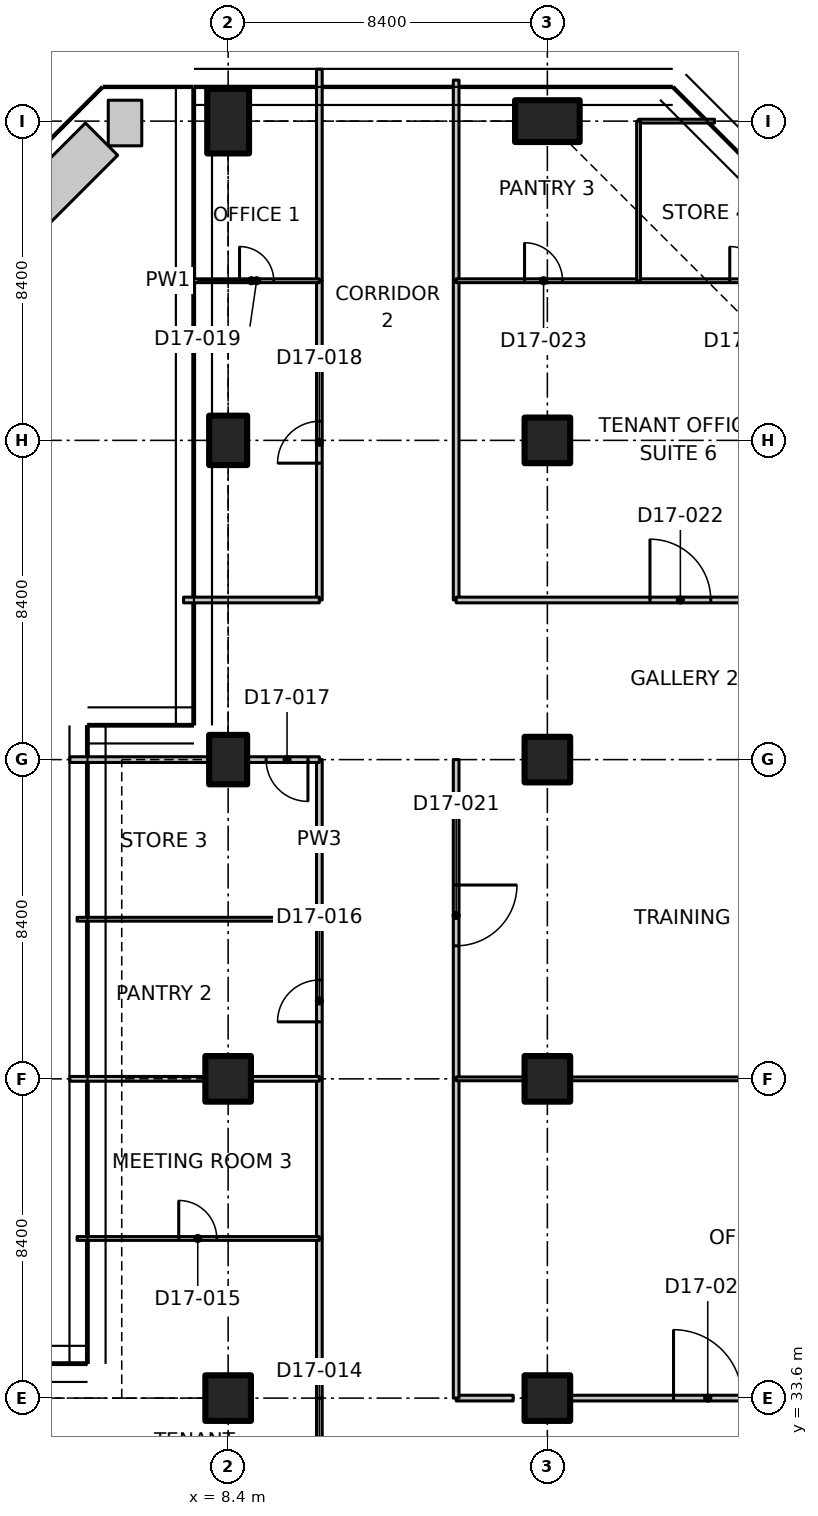
"""IFC4 building model, lengths in metres.
Left out: names, types, materials, properties, quantities, classifications, styles, units other than length and angle.
Written with IfcOpenShell. Run it as: python <this file> out.ifc"""

import sys

from ifc_helpers import new_model, si_unit, direction, frame, frame_2d, origin, origin_2d, place, context, subcontext, project, spatial, polyline, rectangle, outline, extrude, element, fill, save


model = new_model("IFC4")
c1 = context("Model", 3, precision=1e-05, world=origin(), true_north=direction((0.0, 1.0)))
c2 = subcontext(c1, "Body", "Model", "MODEL_VIEW")
j1 = project(units=[si_unit("LENGTHUNIT", "METRE"), si_unit("PLANEANGLEUNIT", "RADIAN")], contexts=[c1])
p1 = place(None, origin())
s1 = spatial("IfcSite", under=j1, at=p1, CompositionType="ELEMENT")
p2 = place(p1, origin())
s2 = spatial("IfcBuilding", under=s1, at=p2, CompositionType="ELEMENT")
p3 = place(p2, frame((0.0, 0.0, 134.9)))
s3 = spatial("IfcBuildingStorey", under=s2, at=p3, CompositionType="ELEMENT", Elevation=134.9)
for number, where, z_axis, x_axis in (
    (1, (8.4, 33.6, 0.0), (0.0, 0.0, 1.0), (1.0, 0.0, 0.0)),
    (2, (8.4, 42.0, 0.0), (0.0, 0.0, 1.0), (1.0, 0.0, 0.0)),
):
    element("IfcColumn", number, at=place(p3, frame(where, z_axis=z_axis, x_axis=x_axis)), inside=s3, PredefinedType="COLUMN", context=c2, shape_type="SweptSolid", body=[
        extrude(rectangle(XDim=1.2, YDim=1.2, at=origin_2d()), origin(), (0.0, 0.0, 1.0), 3.35),
    ])
for number, where, z_axis, x_axis in (
    (3, (8.4, 50.4, 0.0), (0.0, 0.0, 1.0), (1.0, 0.0, 0.0)),
    (4, (8.4, 58.8, 0.0), (0.0, 0.0, 1.0), (1.0, 0.0, 0.0)),
):
    element("IfcColumn", number, at=place(p3, frame(where, z_axis=z_axis, x_axis=x_axis)), inside=s3, PredefinedType="COLUMN", context=c2, shape_type="SweptSolid", body=[
        extrude(rectangle(XDim=1.0, YDim=1.3, at=origin_2d()), origin(), (0.0, 0.0, 1.0), 3.35),
    ])
p4 = place(p3, frame((8.4, 67.2, 0.0), z_axis=(0.0, 0.0, 1.0), x_axis=(1.0, 0.0, 0.0)))
e5 = element("IfcColumn", 5, at=p4, inside=s3, PredefinedType="COLUMN", context=c2, shape_type="SweptSolid", body=[
    extrude(rectangle(XDim=1.1, YDim=1.7, at=origin_2d()), origin(), (0.0, 0.0, 1.0), 3.35),
])
for number, where, z_axis, x_axis in (
    (6, (16.8, 33.6, 0.0), (0.0, 0.0, 1.0), (1.0, 0.0, 0.0)),
    (7, (16.8, 42.0, 0.0), (0.0, 0.0, 1.0), (1.0, 0.0, 0.0)),
    (8, (16.8, 50.4, 0.0), (0.0, 0.0, 1.0), (1.0, 0.0, 0.0)),
    (9, (16.8, 58.8, 0.0), (0.0, 0.0, 1.0), (1.0, 0.0, 0.0)),
):
    element("IfcColumn", number, at=place(p3, frame(where, z_axis=z_axis, x_axis=x_axis)), inside=s3, PredefinedType="COLUMN", context=c2, shape_type="SweptSolid", body=[
        extrude(rectangle(XDim=1.2, YDim=1.2, at=origin_2d()), origin(), (0.0, 0.0, 1.0), 3.35),
    ])
p5 = place(p3, frame((16.8, 67.2, 0.0), z_axis=(0.0, 0.0, 1.0), x_axis=(0.0, 1.0, 0.0)))
e10 = element("IfcColumn", 10, at=p5, inside=s3, PredefinedType="COLUMN", context=c2, shape_type="SweptSolid", body=[
    extrude(rectangle(XDim=1.1, YDim=1.7, at=origin_2d()), origin(), (0.0, 0.0, 1.0), 3.35),
])
p6 = place(p3, frame((6.127, 67.15, 0.0), z_axis=(0.0, 0.0, 1.0), x_axis=(-1.0, 0.0, 0.0)))
e11 = element("IfcWall", 11, at=p6, inside=s3, PredefinedType="PARAPET", context=c2, shape_type="SweptSolid", body=[
    extrude(rectangle(XDim=0.882, YDim=1.2, at=frame_2d((0.441, 0.0))), origin(), (0.0, 0.0, 1.0), 1.3),
])
p7 = place(p3, frame((5.069, 66.726, 0.0), z_axis=(0.0, 0.0, 1.0), x_axis=(-0.707106781187, -0.707106781187, 0.0)))
e12 = element("IfcWall", 12, at=p7, inside=s3, PredefinedType="PARAPET", context=c2, shape_type="SweptSolid", body=[
    extrude(rectangle(XDim=7.347, YDim=1.2, at=frame_2d((3.673, 0.0))), origin(), (0.0, 0.0, 1.0), 1.3),
])
p8 = place(p3, frame((10.8, 29.4, 0.0), z_axis=(0.0, 0.0, 1.0), x_axis=(0.0, 1.0, 0.0)))
e13 = element("IfcWall", 13, at=p8, inside=s3, PredefinedType="PARTITIONING", context=c2, shape_type="SweptSolid", body=[
    extrude(rectangle(XDim=4.2, YDim=0.15, at=frame_2d((2.1, 0.0))), origin(), (0.0, 0.0, 1.0), 3.33),
])
p9 = place(p8, frame((1.2, 0.0, 0.0)))
e14 = element("IfcOpeningElement", 14, at=p9, cuts=e13, PredefinedType="OPENING", context=c2, shape_type="SweptSolid", body=[
    extrude(rectangle(XDim=1.6, YDim=2.1, at=frame_2d((0.8, 1.05))), frame((0.0, 0.085, 0.0), z_axis=(0.0, -1.0, 0.0), x_axis=(1.0, 0.0, 0.0)), (0.0, 0.0, 1.0), 0.17),
])
p10 = place(p3, frame((14.4, 33.6, 0.0), z_axis=(0.0, 0.0, 1.0), x_axis=(1.0, 0.0, 0.0)))
e15 = element("IfcWall", 15, at=p10, inside=s3, PredefinedType="PARTITIONING", context=c2, shape_type="SweptSolid", body=[
    extrude(rectangle(XDim=1.5, YDim=0.15, at=frame_2d((0.75, 0.0))), origin(), (0.0, 0.0, 1.0), 3.33),
])
p11 = place(p3, frame((17.42, 33.6, 0.0), z_axis=(0.0, 0.0, 1.0), x_axis=(1.0, 0.0, 0.0)))
e16 = element("IfcWall", 16, at=p11, inside=s3, PredefinedType="PARTITIONING", context=c2, shape_type="SweptSolid", body=[
    extrude(rectangle(XDim=7.26, YDim=0.15, at=frame_2d((3.63, 0.0))), origin(), (0.0, 0.0, 1.0), 3.33),
])
p12 = place(p11, frame((2.7, 0.0, 0.0)))
e17 = element("IfcOpeningElement", 17, at=p12, cuts=e16, PredefinedType="OPENING", context=c2, shape_type="SweptSolid", body=[
    extrude(rectangle(XDim=1.8, YDim=2.1, at=frame_2d((0.9, 1.05))), frame((0.0, 0.085, 0.0), z_axis=(0.0, -1.0, 0.0), x_axis=(1.0, 0.0, 0.0)), (0.0, 0.0, 1.0), 0.17),
])
for number, where, z_axis, x_axis in (
    (18, (10.8, 33.6, 0.0), (0.0, 0.0, 1.0), (0.0, 1.0, 0.0)),
    (19, (10.8, 37.8, 0.0), (0.0, 0.0, 1.0), (0.0, 1.0, 0.0)),
):
    element("IfcWall", number, at=place(p3, frame(where, z_axis=z_axis, x_axis=x_axis)), inside=s3, PredefinedType="PARTITIONING", context=c2, shape_type="SweptSolid", body=[
        extrude(rectangle(XDim=4.2, YDim=0.15, at=frame_2d((2.1, 0.0))), origin(), (0.0, 0.0, 1.0), 3.33),
    ])
p13 = place(p3, frame((10.8, 42.0, 0.0), z_axis=(0.0, 0.0, 1.0), x_axis=(0.0, 1.0, 0.0)))
e20 = element("IfcWall", 20, at=p13, inside=s3, PredefinedType="PARTITIONING", context=c2, shape_type="SweptSolid", body=[
    extrude(rectangle(XDim=4.2, YDim=0.15, at=frame_2d((2.1, 0.0))), origin(), (0.0, 0.0, 1.0), 3.33),
])
p14 = place(p13, frame((1.5, 0.0, 0.0)))
e21 = element("IfcOpeningElement", 21, at=p14, cuts=e20, PredefinedType="OPENING", context=c2, shape_type="SweptSolid", body=[
    extrude(rectangle(XDim=1.1, YDim=2.1, at=frame_2d((0.55, 1.05))), frame((0.0, 0.085, 0.0), z_axis=(0.0, -1.0, 0.0), x_axis=(1.0, 0.0, 0.0)), (0.0, 0.0, 1.0), 0.17),
])
p15 = place(p3, frame((10.8, 46.2, 0.0), z_axis=(0.0, 0.0, 1.0), x_axis=(0.0, 1.0, 0.0)))
e22 = element("IfcWall", 22, at=p15, inside=s3, PredefinedType="PARTITIONING", context=c2, shape_type="SweptSolid", body=[
    extrude(rectangle(XDim=4.2, YDim=0.15, at=frame_2d((2.1, 0.0))), origin(), (0.0, 0.0, 1.0), 3.33),
])
p16 = place(p3, frame((10.8, 54.6, 0.0), z_axis=(0.0, 0.0, 1.0), x_axis=(0.0, 1.0, 0.0)))
e23 = element("IfcWall", 23, at=p16, inside=s3, PredefinedType="PARTITIONING", context=c2, shape_type="SweptSolid", body=[
    extrude(rectangle(XDim=8.4, YDim=0.15, at=frame_2d((4.2, 0.0))), origin(), (0.0, 0.0, 1.0), 3.33),
])
p17 = place(p16, frame((3.6, 0.0, 0.0)))
e24 = element("IfcOpeningElement", 24, at=p17, cuts=e23, PredefinedType="OPENING", context=c2, shape_type="SweptSolid", body=[
    extrude(rectangle(XDim=1.1, YDim=2.1, at=frame_2d((0.55, 1.05))), frame((0.0, 0.085, 0.0), z_axis=(0.0, -1.0, 0.0), x_axis=(1.0, 0.0, 0.0)), (0.0, 0.0, 1.0), 0.17),
])
p18 = place(p3, frame((10.8, 63.0, 0.0), z_axis=(0.0, 0.0, 1.0), x_axis=(0.0, 1.0, 0.0)))
e25 = element("IfcWall", 25, at=p18, inside=s3, PredefinedType="PARTITIONING", context=c2, shape_type="SweptSolid", body=[
    extrude(outline(polyline([(0.0, 0.0), (5.565, 0.0), (5.565, 3.33), (5.28, 3.33), (4.65, 3.33), (4.648, 2.98), (3.752, 2.98), (3.75, 3.33), (0.0, 3.33), (0.0, 0.0)])), frame((0.0, 0.075, 0.0), z_axis=(0.0, -1.0, 0.0), x_axis=(1.0, 0.0, 0.0)), (0.0, 0.0, 1.0), 0.15),
])
p19 = place(p3, frame((14.4, 42.0, 0.0), z_axis=(0.0, 0.0, 1.0), x_axis=(0.0, -1.0, 0.0)))
e26 = element("IfcWall", 26, at=p19, inside=s3, PredefinedType="PARTITIONING", context=c2, shape_type="SweptSolid", body=[
    extrude(rectangle(XDim=8.4, YDim=0.15, at=frame_2d((4.2, 0.0))), origin(), (0.0, 0.0, 1.0), 3.33),
])
p20 = place(p3, frame((14.4, 50.4, 0.0), z_axis=(0.0, 0.0, 1.0), x_axis=(0.0, -1.0, 0.0)))
e27 = element("IfcWall", 27, at=p20, inside=s3, PredefinedType="PARTITIONING", context=c2, shape_type="SweptSolid", body=[
    extrude(rectangle(XDim=8.4, YDim=0.15, at=frame_2d((4.2, 0.0))), origin(), (0.0, 0.0, 1.0), 3.33),
])
p21 = place(p20, frame((3.3, 0.0, 0.0)))
e28 = element("IfcOpeningElement", 28, at=p21, cuts=e27, PredefinedType="OPENING", context=c2, shape_type="SweptSolid", body=[
    extrude(rectangle(XDim=1.6, YDim=2.1, at=frame_2d((0.8, 1.05))), frame((0.0, 0.085, 0.0), z_axis=(0.0, -1.0, 0.0), x_axis=(1.0, 0.0, 0.0)), (0.0, 0.0, 1.0), 0.17),
])
p22 = place(p3, frame((14.4, 63.0, 0.0), z_axis=(0.0, 0.0, 1.0), x_axis=(0.0, -1.0, 0.0)))
e29 = element("IfcWall", 29, at=p22, inside=s3, PredefinedType="PARTITIONING", context=c2, shape_type="SweptSolid", body=[
    extrude(rectangle(XDim=8.4, YDim=0.15, at=frame_2d((4.2, 0.0))), origin(), (0.0, 0.0, 1.0), 3.33),
])
p23 = place(p3, frame((14.4, 68.28, 0.0), z_axis=(0.0, 0.0, 1.0), x_axis=(0.0, -1.0, 0.0)))
e30 = element("IfcWall", 30, at=p23, inside=s3, PredefinedType="PARTITIONING", context=c2, shape_type="SweptSolid", body=[
    extrude(outline(polyline([(0.0, 0.0), (5.28, 0.0), (5.28, 3.33), (1.53, 3.33), (1.528, 2.98), (0.632, 2.98), (0.63, 3.33), (0.0, 3.33), (0.0, 0.0)])), frame((0.0, 0.075, 0.0), z_axis=(0.0, -1.0, 0.0), x_axis=(1.0, 0.0, 0.0)), (0.0, 0.0, 1.0), 0.15),
])
p24 = place(p3, frame((10.8, 50.4, 0.0), z_axis=(0.0, 0.0, 1.0), x_axis=(-1.0, 0.0, 0.0)))
e31 = element("IfcWall", 31, at=p24, inside=s3, PredefinedType="PARTITIONING", context=c2, shape_type="SweptSolid", body=[
    extrude(rectangle(XDim=1.88, YDim=0.15, at=frame_2d((0.94, 0.0))), origin(), (0.0, 0.0, 1.0), 3.33),
])
p25 = place(p24, frame((0.3, 0.0, 0.0)))
e32 = element("IfcOpeningElement", 32, at=p25, cuts=e31, PredefinedType="OPENING", context=c2, shape_type="SweptSolid", body=[
    extrude(rectangle(XDim=1.1, YDim=2.1, at=frame_2d((0.55, 1.05))), frame((0.0, 0.085, 0.0), z_axis=(0.0, -1.0, 0.0), x_axis=(1.0, 0.0, 0.0)), (0.0, 0.0, 1.0), 0.17),
])
p26 = place(p3, frame((7.88, 50.4, 0.0), z_axis=(0.0, 0.0, 1.0), x_axis=(-1.0, 0.0, 0.0)))
e33 = element("IfcWall", 33, at=p26, inside=s3, PredefinedType="PARTITIONING", context=c2, shape_type="SweptSolid", body=[
    extrude(rectangle(XDim=3.645, YDim=0.15, at=frame_2d((1.822, 0.0))), origin(), (0.0, 0.0, 1.0), 2.98),
])
p27 = place(p3, frame((7.226, 54.6, 0.0), z_axis=(0.0, 0.0, 1.0), x_axis=(1.0, 0.0, 0.0)))
e34 = element("IfcWall", 34, at=p27, inside=s3, PredefinedType="PARTITIONING", context=c2, shape_type="SweptSolid", body=[
    extrude(rectangle(XDim=3.574, YDim=0.15, at=frame_2d((1.787, 0.0))), origin(), (0.0, 0.0, 1.0), 2.98),
])
p28 = place(p3, frame((4.426, 37.8, 0.0), z_axis=(0.0, 0.0, 1.0), x_axis=(1.0, 0.0, 0.0)))
e35 = element("IfcWall", 35, at=p28, inside=s3, PredefinedType="PARTITIONING", context=c2, shape_type="SweptSolid", body=[
    extrude(outline(polyline([(0.0, 0.0), (6.374, 0.0), (6.374, 3.33), (1.624, 3.33), (1.622, 2.98), (0.726, 2.98), (0.724, 3.33), (0.074, 3.33), (0.0, 3.33), (0.0, 0.0)])), frame((0.0, 0.05, 0.0), z_axis=(0.0, -1.0, 0.0), x_axis=(1.0, 0.0, 0.0)), (0.0, 0.0, 1.0), 0.1),
])
p29 = place(p28, frame((2.674, 0.0, 0.0)))
e36 = element("IfcOpeningElement", 36, at=p29, cuts=e35, PredefinedType="OPENING", context=c2, shape_type="SweptSolid", body=[
    extrude(rectangle(XDim=1.0, YDim=2.1, at=frame_2d((0.5, 1.05))), frame((0.0, 0.06, 0.0), z_axis=(0.0, -1.0, 0.0), x_axis=(1.0, 0.0, 0.0)), (0.0, 0.0, 1.0), 0.12),
])
p30 = place(p3, frame((4.235, 42.0, 0.0), z_axis=(0.0, 0.0, 1.0), x_axis=(1.0, 0.0, 0.0)))
e37 = element("IfcWall", 37, at=p30, inside=s3, PredefinedType="PARTITIONING", context=c2, shape_type="SweptSolid", body=[
    extrude(rectangle(XDim=3.545, YDim=0.125, at=frame_2d((1.772, 0.0))), origin(), (0.0, 0.0, 1.0), 2.98),
])
p31 = place(p3, frame((9.02, 42.0, 0.0), z_axis=(0.0, 0.0, 1.0), x_axis=(1.0, 0.0, 0.0)))
e38 = element("IfcWall", 38, at=p31, inside=s3, PredefinedType="PARTITIONING", context=c2, shape_type="SweptSolid", body=[
    extrude(rectangle(XDim=1.78, YDim=0.125, at=frame_2d((0.89, 0.0))), origin(), (0.0, 0.0, 1.0), 3.33),
])
p32 = place(p3, frame((4.426, 46.2, 0.0), z_axis=(0.0, 0.0, 1.0), x_axis=(1.0, 0.0, 0.0)))
e39 = element("IfcWall", 39, at=p32, inside=s3, PredefinedType="PARTITIONING", context=c2, shape_type="SweptSolid", body=[
    extrude(outline(polyline([(0.0, 0.0), (6.374, 0.0), (6.374, 3.33), (1.624, 3.33), (1.622, 2.98), (0.726, 2.98), (0.724, 3.33), (0.074, 3.33), (0.0, 3.33), (0.0, 0.0)])), frame((0.0, 0.05, 0.0), z_axis=(0.0, -1.0, 0.0), x_axis=(1.0, 0.0, 0.0)), (0.0, 0.0, 1.0), 0.1),
])
p33 = place(p3, frame((7.226, 63.0, 0.0), z_axis=(0.0, 0.0, 1.0), x_axis=(1.0, 0.0, 0.0)))
e40 = element("IfcWall", 40, at=p33, inside=s3, PredefinedType="PARTITIONING", context=c2, shape_type="SweptSolid", body=[
    extrude(rectangle(XDim=3.574, YDim=0.1, at=frame_2d((1.787, 0.0))), origin(), (0.0, 0.0, 1.0), 2.98),
])
p34 = place(p33, frame((1.474, 0.0, 0.0)))
e41 = element("IfcOpeningElement", 41, at=p34, cuts=e40, PredefinedType="OPENING", context=c2, shape_type="SweptSolid", body=[
    extrude(rectangle(XDim=0.9, YDim=2.1, at=frame_2d((0.45, 1.05))), frame((0.0, 0.06, 0.0), z_axis=(0.0, -1.0, 0.0), x_axis=(1.0, 0.0, 0.0)), (0.0, 0.0, 1.0), 0.12),
])
p35 = place(p3, frame((14.4, 54.6, 0.0), z_axis=(0.0, 0.0, 1.0), x_axis=(1.0, 0.0, 0.0)))
e42 = element("IfcWall", 42, at=p35, inside=s3, PredefinedType="PARTITIONING", context=c2, shape_type="SweptSolid", body=[
    extrude(outline(polyline([(0.0, 0.0), (12.165, 0.0), (12.165, 3.33), (11.9, 3.33), (11.25, 3.33), (11.248, 2.98), (10.352, 2.98), (10.35, 3.33), (0.0, 3.33), (0.0, 0.0)])), frame((0.0, 0.075, 0.0), z_axis=(0.0, -1.0, 0.0), x_axis=(1.0, 0.0, 0.0)), (0.0, 0.0, 1.0), 0.15),
])
p36 = place(p35, frame((5.1, 0.0, 0.0)))
e43 = element("IfcOpeningElement", 43, at=p36, cuts=e42, PredefinedType="OPENING", context=c2, shape_type="SweptSolid", body=[
    extrude(rectangle(XDim=1.6, YDim=2.1, at=frame_2d((0.8, 1.05))), frame((0.0, 0.085, 0.0), z_axis=(0.0, -1.0, 0.0), x_axis=(1.0, 0.0, 0.0)), (0.0, 0.0, 1.0), 0.17),
])
p37 = place(p3, frame((14.4, 42.0, 0.0), z_axis=(0.0, 0.0, 1.0), x_axis=(1.0, 0.0, 0.0)))
e44 = element("IfcWall", 44, at=p37, inside=s3, PredefinedType="PARTITIONING", context=c2, shape_type="SweptSolid", body=[
    extrude(rectangle(XDim=1.78, YDim=0.1, at=frame_2d((0.89, 0.0))), origin(), (0.0, 0.0, 1.0), 3.33),
])
p38 = place(p3, frame((17.42, 42.0, 0.0), z_axis=(0.0, 0.0, 1.0), x_axis=(1.0, 0.0, 0.0)))
e45 = element("IfcWall", 45, at=p38, inside=s3, PredefinedType="PARTITIONING", context=c2, shape_type="SweptSolid", body=[
    extrude(rectangle(XDim=7.26, YDim=0.1, at=frame_2d((3.63, 0.0))), origin(), (0.0, 0.0, 1.0), 3.33),
])
p39 = place(p3, frame((14.4, 63.0, 0.0), z_axis=(0.0, 0.0, 1.0), x_axis=(1.0, 0.0, 0.0)))
e46 = element("IfcWall", 46, at=p39, inside=s3, PredefinedType="PARTITIONING", context=c2, shape_type="SweptSolid", body=[
    extrude(rectangle(XDim=4.8, YDim=0.1, at=frame_2d((2.4, 0.0))), origin(), (0.0, 0.0, 1.0), 3.33),
])
p40 = place(p39, frame((1.8, 0.0, 0.0)))
e47 = element("IfcOpeningElement", 47, at=p40, cuts=e46, PredefinedType="OPENING", context=c2, shape_type="SweptSolid", body=[
    extrude(rectangle(XDim=1.0, YDim=2.1, at=frame_2d((0.5, 1.05))), frame((0.0, 0.06, 0.0), z_axis=(0.0, -1.0, 0.0), x_axis=(1.0, 0.0, 0.0)), (0.0, 0.0, 1.0), 0.12),
])
p41 = place(p3, frame((19.2, 63.0, 0.0), z_axis=(0.0, 0.0, 1.0), x_axis=(1.0, 0.0, 0.0)))
e48 = element("IfcWall", 48, at=p41, inside=s3, PredefinedType="PARTITIONING", context=c2, shape_type="SweptSolid", body=[
    extrude(outline(polyline([(0.0, 0.0), (6.2, 0.0), (6.2, 3.33), (2.466, 3.33), (2.464, 2.98), (1.136, 2.98), (1.134, 3.33), (0.0, 3.33), (0.0, 0.0)])), frame((0.0, 0.05, 0.0), z_axis=(0.0, -1.0, 0.0), x_axis=(1.0, 0.0, 0.0)), (0.0, 0.0, 1.0), 0.1),
])
p42 = place(p41, frame((2.4, 0.0, 0.0)))
e49 = element("IfcOpeningElement", 49, at=p42, cuts=e48, PredefinedType="OPENING", context=c2, shape_type="SweptSolid", body=[
    extrude(rectangle(XDim=0.9, YDim=2.1, at=frame_2d((0.45, 1.05))), frame((0.0, 0.06, 0.0), z_axis=(0.0, -1.0, 0.0), x_axis=(1.0, 0.0, 0.0)), (0.0, 0.0, 1.0), 0.12),
])
p43 = place(p3, frame((21.2, 67.2, 0.0), z_axis=(0.0, 0.0, 1.0), x_axis=(-1.0, 0.0, 0.0)))
e50 = element("IfcWall", 50, at=p43, inside=s3, PredefinedType="PARTITIONING", context=c2, shape_type="SweptSolid", body=[
    extrude(rectangle(XDim=2.0, YDim=0.1, at=frame_2d((1.0, 0.0))), origin(), (0.0, 0.0, 1.0), 3.33),
])
p44 = place(p3, frame((19.2, 67.2, 0.0), z_axis=(0.0, 0.0, 1.0), x_axis=(0.0, -1.0, 0.0)))
e51 = element("IfcWall", 51, at=p44, inside=s3, PredefinedType="PARTITIONING", context=c2, shape_type="SweptSolid", body=[
    extrude(rectangle(XDim=4.2, YDim=0.1, at=frame_2d((2.1, 0.0))), origin(), (0.0, 0.0, 1.0), 2.98),
])
p45 = place(p29, origin())
e52 = element("IfcDoor", 52, at=p45, inside=s3, OperationType="SINGLE_SWING_LEFT", PredefinedType="DOOR", context=c2, shape_type="SweptSolid", body=[
    extrude(rectangle(XDim=1.0, YDim=2.1, at=frame_2d((0.5, 1.05))), frame((0.0, 0.025, 0.0), z_axis=(0.0, -1.0, 0.0), x_axis=(1.0, 0.0, 0.0)), (0.0, 0.0, 1.0), 0.05),
])
fill(e36, e52)
p46 = place(p14, origin())
e53 = element("IfcDoor", 53, at=p46, inside=s3, OperationType="SINGLE_SWING_LEFT", PredefinedType="DOOR", context=c2, shape_type="SweptSolid", body=[
    extrude(rectangle(XDim=1.1, YDim=2.1, at=frame_2d((0.55, 1.05))), frame((0.0, 0.025, 0.0), z_axis=(0.0, -1.0, 0.0), x_axis=(1.0, 0.0, 0.0)), (0.0, 0.0, 1.0), 0.05),
])
fill(e21, e53)
p47 = place(p25, origin())
e54 = element("IfcDoor", 54, at=p47, inside=s3, OperationType="SINGLE_SWING_LEFT", PredefinedType="DOOR", context=c2, shape_type="SweptSolid", body=[
    extrude(rectangle(XDim=1.1, YDim=2.1, at=frame_2d((0.55, 1.05))), frame((0.0, 0.025, 0.0), z_axis=(0.0, -1.0, 0.0), x_axis=(1.0, 0.0, 0.0)), (0.0, 0.0, 1.0), 0.05),
])
fill(e32, e54)
p48 = place(p17, origin())
e55 = element("IfcDoor", 55, at=p48, inside=s3, OperationType="SINGLE_SWING_LEFT", PredefinedType="DOOR", context=c2, shape_type="SweptSolid", body=[
    extrude(rectangle(XDim=1.1, YDim=2.1, at=frame_2d((0.55, 1.05))), frame((0.0, 0.025, 0.0), z_axis=(0.0, -1.0, 0.0), x_axis=(1.0, 0.0, 0.0)), (0.0, 0.0, 1.0), 0.05),
])
fill(e24, e55)
p49 = place(p34, origin())
e56 = element("IfcDoor", 56, at=p49, inside=s3, OperationType="SINGLE_SWING_LEFT", PredefinedType="DOOR", context=c2, shape_type="SweptSolid", body=[
    extrude(rectangle(XDim=0.9, YDim=2.1, at=frame_2d((0.45, 1.05))), frame((0.0, 0.025, 0.0), z_axis=(0.0, -1.0, 0.0), x_axis=(1.0, 0.0, 0.0)), (0.0, 0.0, 1.0), 0.05),
])
fill(e41, e56)
p50 = place(p12, origin())
e57 = element("IfcDoor", 57, at=p50, inside=s3, OperationType="DOUBLE_DOOR_SINGLE_SWING", PredefinedType="DOOR", context=c2, shape_type="SweptSolid", body=[
    extrude(rectangle(XDim=1.8, YDim=2.1, at=frame_2d((0.9, 1.05))), frame((0.0, 0.025, 0.0), z_axis=(0.0, -1.0, 0.0), x_axis=(1.0, 0.0, 0.0)), (0.0, 0.0, 1.0), 0.05),
])
fill(e17, e57)
p51 = place(p21, origin())
e58 = element("IfcDoor", 58, at=p51, inside=s3, OperationType="DOUBLE_DOOR_SINGLE_SWING", PredefinedType="DOOR", context=c2, shape_type="SweptSolid", body=[
    extrude(rectangle(XDim=1.6, YDim=2.1, at=frame_2d((0.8, 1.05))), frame((0.0, 0.025, 0.0), z_axis=(0.0, -1.0, 0.0), x_axis=(1.0, 0.0, 0.0)), (0.0, 0.0, 1.0), 0.05),
])
fill(e28, e58)
p52 = place(p36, origin())
e59 = element("IfcDoor", 59, at=p52, inside=s3, OperationType="DOUBLE_DOOR_SINGLE_SWING", PredefinedType="DOOR", context=c2, shape_type="SweptSolid", body=[
    extrude(rectangle(XDim=1.6, YDim=2.1, at=frame_2d((0.8, 1.05))), frame((0.0, 0.025, 0.0), z_axis=(0.0, -1.0, 0.0), x_axis=(1.0, 0.0, 0.0)), (0.0, 0.0, 1.0), 0.05),
])
fill(e43, e59)
p53 = place(p40, origin())
e60 = element("IfcDoor", 60, at=p53, inside=s3, OperationType="SINGLE_SWING_LEFT", PredefinedType="DOOR", context=c2, shape_type="SweptSolid", body=[
    extrude(rectangle(XDim=1.0, YDim=2.1, at=frame_2d((0.5, 1.05))), frame((0.0, 0.025, 0.0), z_axis=(0.0, -1.0, 0.0), x_axis=(1.0, 0.0, 0.0)), (0.0, 0.0, 1.0), 0.05),
])
fill(e47, e60)
p54 = place(p42, origin())
e61 = element("IfcDoor", 61, at=p54, inside=s3, OperationType="SINGLE_SWING_LEFT", PredefinedType="DOOR", context=c2, shape_type="SweptSolid", body=[
    extrude(rectangle(XDim=0.9, YDim=2.1, at=frame_2d((0.45, 1.05))), frame((0.0, 0.025, 0.0), z_axis=(0.0, -1.0, 0.0), x_axis=(1.0, 0.0, 0.0)), (0.0, 0.0, 1.0), 0.05),
])
fill(e49, e61)
save(model, sys.argv[1])
